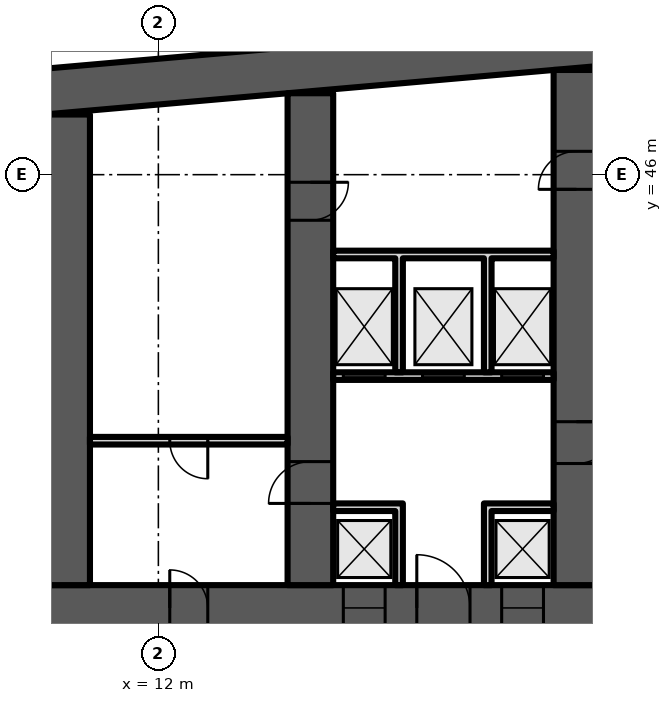
"""IFC4 building model, lengths in metres.
Left out: names, types, materials, properties, quantities, classifications, styles, units other than length and angle.
Written with IfcOpenShell. Run it as: python <this file> out.ifc"""

import sys

from ifc_helpers import new_model, si_unit, direction, frame, frame_2d, origin, place, context, subcontext, project, spatial, polyline, rectangle, outline, extrude, element, fill, save


model = new_model("IFC4")
c1 = context("Model", 3, precision=1e-05, world=origin(), true_north=direction((0.0, 1.0)))
c2 = subcontext(c1, "Body", "Model", "MODEL_VIEW")
j1 = project(units=[si_unit("LENGTHUNIT", "METRE"), si_unit("PLANEANGLEUNIT", "RADIAN")], contexts=[c1])
p1 = place(None, origin())
s1 = spatial("IfcSite", under=j1, at=p1, CompositionType="ELEMENT")
p2 = place(p1, origin())
s2 = spatial("IfcBuilding", under=s1, at=p2, CompositionType="ELEMENT")
p3 = place(p2, frame((0.0, 0.0, 55.9)))
s3 = spatial("IfcBuildingStorey", under=s2, at=p3, CompositionType="ELEMENT", Elevation=55.9)
p4 = place(p3, origin())
e1 = element("IfcWall", 1, at=p4, inside=s3, PredefinedType="SHEAR", context=c2, shape_type="SweptSolid", body=[
    extrude(outline(polyline([(9.0, 47.583), (37.0, 50.032), (65.0, 47.583), (65.0, 48.787), (37.0, 51.237), (9.0, 48.787), (9.0, 47.583)])), origin(), (0.0, 0.0, 1.0), 3.6),
])
p5 = place(p3, frame((9.0, 34.6, 0.0), z_axis=(0.0, 0.0, 1.0), x_axis=(1.0, 0.0, 0.0)))
e2 = element("IfcWall", 2, at=p5, inside=s3, PredefinedType="SHEAR", context=c2, shape_type="SweptSolid", body=[
    extrude(rectangle(XDim=56.0, YDim=1.2, at=frame_2d((28.0, 0.0))), origin(), (0.0, 0.0, 1.0), 3.6),
])
p6 = place(p5, frame((3.3, 0.0, 0.0)))
e3 = element("IfcOpeningElement", 3, at=p6, cuts=e2, PredefinedType="OPENING", context=c2, shape_type="SweptSolid", body=[
    extrude(rectangle(XDim=1.0, YDim=2.1, at=frame_2d((0.5, 1.05))), frame((0.0, 0.61, 0.0), z_axis=(0.0, -1.0, 0.0), x_axis=(1.0, 0.0, 0.0)), (0.0, 0.0, 1.0), 1.22),
])
p7 = place(p5, frame((7.867, 0.0, 0.0)))
e4 = element("IfcOpeningElement", 4, at=p7, cuts=e2, PredefinedType="OPENING", context=c2, shape_type="SweptSolid", body=[
    extrude(rectangle(XDim=1.1, YDim=2.1, at=frame_2d((0.55, 1.05))), frame((0.0, 0.61, 0.0), z_axis=(0.0, -1.0, 0.0), x_axis=(1.0, 0.0, 0.0)), (0.0, 0.0, 1.0), 1.22),
])
p8 = place(p5, frame((12.033, 0.0, 0.0)))
e5 = element("IfcOpeningElement", 5, at=p8, cuts=e2, PredefinedType="OPENING", context=c2, shape_type="SweptSolid", body=[
    extrude(rectangle(XDim=1.1, YDim=2.1, at=frame_2d((0.55, 1.05))), frame((0.0, 0.61, 0.0), z_axis=(0.0, -1.0, 0.0), x_axis=(1.0, 0.0, 0.0)), (0.0, 0.0, 1.0), 1.22),
])
p9 = place(p5, frame((9.8, 0.0, 0.0)))
e6 = element("IfcOpeningElement", 6, at=p9, cuts=e2, PredefinedType="OPENING", context=c2, shape_type="SweptSolid", body=[
    extrude(rectangle(XDim=1.4, YDim=2.1, at=frame_2d((0.7, 1.05))), frame((0.0, 0.61, 0.0), z_axis=(0.0, -1.0, 0.0), x_axis=(1.0, 0.0, 0.0)), (0.0, 0.0, 1.0), 1.22),
])
p10 = place(p5, frame((14.65, 0.0, 0.0)))
e7 = element("IfcOpeningElement", 7, at=p10, cuts=e2, PredefinedType="OPENING", context=c2, shape_type="SweptSolid", body=[
    extrude(rectangle(XDim=1.2, YDim=2.1, at=frame_2d((0.6, 1.05))), frame((0.0, 0.61, 0.0), z_axis=(0.0, -1.0, 0.0), x_axis=(1.0, 0.0, 0.0)), (0.0, 0.0, 1.0), 1.22),
])
p11 = place(p5, frame((21.867, 0.0, 0.0)))
e8 = element("IfcOpeningElement", 8, at=p11, cuts=e2, PredefinedType="OPENING", context=c2, shape_type="SweptSolid", body=[
    extrude(rectangle(XDim=1.1, YDim=2.1, at=frame_2d((0.55, 1.05))), frame((0.0, 0.61, 0.0), z_axis=(0.0, -1.0, 0.0), x_axis=(1.0, 0.0, 0.0)), (0.0, 0.0, 1.0), 1.22),
])
p12 = place(p5, frame((26.033, 0.0, 0.0)))
e9 = element("IfcOpeningElement", 9, at=p12, cuts=e2, PredefinedType="OPENING", context=c2, shape_type="SweptSolid", body=[
    extrude(rectangle(XDim=1.1, YDim=2.1, at=frame_2d((0.55, 1.05))), frame((0.0, 0.61, 0.0), z_axis=(0.0, -1.0, 0.0), x_axis=(1.0, 0.0, 0.0)), (0.0, 0.0, 1.0), 1.22),
])
p13 = place(p5, frame((23.8, 0.0, 0.0)))
e10 = element("IfcOpeningElement", 10, at=p13, cuts=e2, PredefinedType="OPENING", context=c2, shape_type="SweptSolid", body=[
    extrude(rectangle(XDim=1.4, YDim=2.1, at=frame_2d((0.7, 1.05))), frame((0.0, 0.61, 0.0), z_axis=(0.0, -1.0, 0.0), x_axis=(1.0, 0.0, 0.0)), (0.0, 0.0, 1.0), 1.22),
])
p14 = place(p5, frame((28.867, 0.0, 0.0)))
e11 = element("IfcOpeningElement", 11, at=p14, cuts=e2, PredefinedType="OPENING", context=c2, shape_type="SweptSolid", body=[
    extrude(rectangle(XDim=1.1, YDim=2.1, at=frame_2d((0.55, 1.05))), frame((0.0, 0.61, 0.0), z_axis=(0.0, -1.0, 0.0), x_axis=(1.0, 0.0, 0.0)), (0.0, 0.0, 1.0), 1.22),
])
p15 = place(p5, frame((33.033, 0.0, 0.0)))
e12 = element("IfcOpeningElement", 12, at=p15, cuts=e2, PredefinedType="OPENING", context=c2, shape_type="SweptSolid", body=[
    extrude(rectangle(XDim=1.1, YDim=2.1, at=frame_2d((0.55, 1.05))), frame((0.0, 0.61, 0.0), z_axis=(0.0, -1.0, 0.0), x_axis=(1.0, 0.0, 0.0)), (0.0, 0.0, 1.0), 1.22),
])
p16 = place(p5, frame((40.15, 0.0, 0.0)))
e13 = element("IfcOpeningElement", 13, at=p16, cuts=e2, PredefinedType="OPENING", context=c2, shape_type="SweptSolid", body=[
    extrude(rectangle(XDim=1.2, YDim=2.1, at=frame_2d((0.6, 1.05))), frame((0.0, 0.61, 0.0), z_axis=(0.0, -1.0, 0.0), x_axis=(1.0, 0.0, 0.0)), (0.0, 0.0, 1.0), 1.22),
])
p17 = place(p5, frame((44.8, 0.0, 0.0)))
e14 = element("IfcOpeningElement", 14, at=p17, cuts=e2, PredefinedType="OPENING", context=c2, shape_type="SweptSolid", body=[
    extrude(rectangle(XDim=1.4, YDim=2.1, at=frame_2d((0.7, 1.05))), frame((0.0, 0.61, 0.0), z_axis=(0.0, -1.0, 0.0), x_axis=(1.0, 0.0, 0.0)), (0.0, 0.0, 1.0), 1.22),
])
p18 = place(p5, frame((49.867, 0.0, 0.0)))
e15 = element("IfcOpeningElement", 15, at=p18, cuts=e2, PredefinedType="OPENING", context=c2, shape_type="SweptSolid", body=[
    extrude(rectangle(XDim=1.1, YDim=2.1, at=frame_2d((0.55, 1.05))), frame((0.0, 0.61, 0.0), z_axis=(0.0, -1.0, 0.0), x_axis=(1.0, 0.0, 0.0)), (0.0, 0.0, 1.0), 1.22),
])
p19 = place(p5, frame((53.5, 0.0, 0.0)))
e16 = element("IfcOpeningElement", 16, at=p19, cuts=e2, PredefinedType="OPENING", context=c2, shape_type="SweptSolid", body=[
    extrude(rectangle(XDim=1.1, YDim=2.1, at=frame_2d((0.55, 1.05))), frame((0.0, 0.61, 0.0), z_axis=(0.0, -1.0, 0.0), x_axis=(1.0, 0.0, 0.0)), (0.0, 0.0, 1.0), 1.22),
])
p20 = place(p5, frame((51.567, 0.0, 0.0)))
e17 = element("IfcOpeningElement", 17, at=p20, cuts=e2, PredefinedType="OPENING", context=c2, shape_type="SweptSolid", body=[
    extrude(rectangle(XDim=1.4, YDim=2.1, at=frame_2d((0.7, 1.05))), frame((0.0, 0.61, 0.0), z_axis=(0.0, -1.0, 0.0), x_axis=(1.0, 0.0, 0.0)), (0.0, 0.0, 1.0), 1.22),
])
p21 = place(p3, frame((9.6, 35.2, 0.0), z_axis=(0.0, 0.0, 1.0), x_axis=(0.0, 1.0, 0.0)))
e18 = element("IfcWall", 18, at=p21, inside=s3, PredefinedType="SHEAR", context=c2, shape_type="SweptSolid", body=[
    extrude(rectangle(XDim=12.383, YDim=1.2, at=frame_2d((6.191, 0.0))), origin(), (0.0, 0.0, 1.0), 3.6),
])
p22 = place(p3, frame((16.0, 35.2, 0.0), z_axis=(0.0, 0.0, 1.0), x_axis=(0.0, 1.0, 0.0)))
e19 = element("IfcWall", 19, at=p22, inside=s3, PredefinedType="SHEAR", context=c2, shape_type="SweptSolid", body=[
    extrude(rectangle(XDim=12.943, YDim=1.2, at=frame_2d((6.471, 0.0))), origin(), (0.0, 0.0, 1.0), 3.6),
])
p23 = place(p22, frame((2.15, 0.0, 0.0)))
e20 = element("IfcOpeningElement", 20, at=p23, cuts=e19, PredefinedType="OPENING", context=c2, shape_type="SweptSolid", body=[
    extrude(rectangle(XDim=1.1, YDim=2.1, at=frame_2d((0.55, 1.05))), frame((0.0, 0.61, 0.0), z_axis=(0.0, -1.0, 0.0), x_axis=(1.0, 0.0, 0.0)), (0.0, 0.0, 1.0), 1.22),
])
p24 = place(p22, frame((9.6, 0.0, 0.0)))
e21 = element("IfcOpeningElement", 21, at=p24, cuts=e19, PredefinedType="OPENING", context=c2, shape_type="SweptSolid", body=[
    extrude(rectangle(XDim=1.0, YDim=2.1, at=frame_2d((0.5, 1.05))), frame((0.0, 0.61, 0.0), z_axis=(0.0, -1.0, 0.0), x_axis=(1.0, 0.0, 0.0)), (0.0, 0.0, 1.0), 1.22),
])
p25 = place(p3, frame((23.0, 35.2, 0.0), z_axis=(0.0, 0.0, 1.0), x_axis=(0.0, 1.0, 0.0)))
e22 = element("IfcWall", 22, at=p25, inside=s3, PredefinedType="SHEAR", context=c2, shape_type="SweptSolid", body=[
    extrude(rectangle(XDim=13.555, YDim=1.2, at=frame_2d((6.778, 0.0))), origin(), (0.0, 0.0, 1.0), 3.6),
])
p26 = place(p25, frame((10.414, 0.0, 0.0)))
e23 = element("IfcOpeningElement", 23, at=p26, cuts=e22, PredefinedType="OPENING", context=c2, shape_type="SweptSolid", body=[
    extrude(rectangle(XDim=1.0, YDim=2.1, at=frame_2d((0.5, 1.05))), frame((0.0, 0.61, 0.0), z_axis=(0.0, -1.0, 0.0), x_axis=(1.0, 0.0, 0.0)), (0.0, 0.0, 1.0), 1.22),
])
p27 = place(p25, frame((3.2, 0.0, 0.0)))
e24 = element("IfcOpeningElement", 24, at=p27, cuts=e22, PredefinedType="OPENING", context=c2, shape_type="SweptSolid", body=[
    extrude(rectangle(XDim=1.1, YDim=2.1, at=frame_2d((0.55, 1.05))), frame((0.0, 0.61, 0.0), z_axis=(0.0, -1.0, 0.0), x_axis=(1.0, 0.0, 0.0)), (0.0, 0.0, 1.0), 1.22),
])
p28 = place(p3, frame((10.2, 39.0, 0.0), z_axis=(0.0, 0.0, 1.0), x_axis=(1.0, 0.0, 0.0)))
e25 = element("IfcWall", 25, at=p28, inside=s3, PredefinedType="PARTITIONING", context=c2, shape_type="SweptSolid", body=[
    extrude(rectangle(XDim=5.2, YDim=0.2, at=frame_2d((2.6, 0.0))), origin(), (0.0, 0.0, 1.0), 3.2),
])
p29 = place(p28, frame((2.1, 0.0, 0.0)))
e26 = element("IfcOpeningElement", 26, at=p29, cuts=e25, PredefinedType="OPENING", context=c2, shape_type="SweptSolid", body=[
    extrude(rectangle(XDim=1.0, YDim=2.1, at=frame_2d((0.5, 1.05))), frame((0.0, 0.11, 0.0), z_axis=(0.0, -1.0, 0.0), x_axis=(1.0, 0.0, 0.0)), (0.0, 0.0, 1.0), 0.22),
])
p30 = place(p3, frame((16.6, 40.7, 0.0), z_axis=(0.0, 0.0, 1.0), x_axis=(1.0, 0.0, 0.0)))
e27 = element("IfcWall", 27, at=p30, inside=s3, PredefinedType="PARTITIONING", context=c2, shape_type="SweptSolid", body=[
    extrude(rectangle(XDim=5.8, YDim=0.2, at=frame_2d((2.9, 0.0))), origin(), (0.0, 0.0, 1.0), 3.2),
])
p31 = place(p30, frame((0.267, 0.0, 0.0)))
e28 = element("IfcOpeningElement", 28, at=p31, cuts=e27, PredefinedType="OPENING", context=c2, shape_type="SweptSolid", body=[
    extrude(rectangle(XDim=1.1, YDim=2.1, at=frame_2d((0.55, 1.05))), frame((0.0, 0.11, 0.0), z_axis=(0.0, -1.0, 0.0), x_axis=(1.0, 0.0, 0.0)), (0.0, 0.0, 1.0), 0.22),
])
p32 = place(p30, frame((2.35, 0.0, 0.0)))
e29 = element("IfcOpeningElement", 29, at=p32, cuts=e27, PredefinedType="OPENING", context=c2, shape_type="SweptSolid", body=[
    extrude(rectangle(XDim=1.1, YDim=2.1, at=frame_2d((0.55, 1.05))), frame((0.0, 0.11, 0.0), z_axis=(0.0, -1.0, 0.0), x_axis=(1.0, 0.0, 0.0)), (0.0, 0.0, 1.0), 0.22),
])
p33 = place(p30, frame((4.433, 0.0, 0.0)))
e30 = element("IfcOpeningElement", 30, at=p33, cuts=e27, PredefinedType="OPENING", context=c2, shape_type="SweptSolid", body=[
    extrude(rectangle(XDim=1.1, YDim=2.1, at=frame_2d((0.55, 1.05))), frame((0.0, 0.11, 0.0), z_axis=(0.0, -1.0, 0.0), x_axis=(1.0, 0.0, 0.0)), (0.0, 0.0, 1.0), 0.22),
])
p34 = place(p3, origin())
e31 = element("IfcWall", 31, at=p34, inside=s3, PredefinedType="PARTITIONING", context=c2, shape_type="SweptSolid", body=[
    extrude(outline(polyline([(18.233, 37.15), (16.6, 37.15), (16.6, 37.35), (18.233, 37.35), (18.433, 37.35), (18.433, 35.2), (18.233, 35.2), (18.233, 37.15)])), origin(), (0.0, 0.0, 1.0), 3.2),
])
p35 = place(p3, origin())
e32 = element("IfcWall", 32, at=p35, inside=s3, PredefinedType="PARTITIONING", context=c2, shape_type="SweptSolid", body=[
    extrude(outline(polyline([(20.567, 37.35), (20.767, 37.35), (22.4, 37.35), (22.4, 37.15), (20.767, 37.15), (20.767, 35.2), (20.567, 35.2), (20.567, 37.35)])), origin(), (0.0, 0.0, 1.0), 3.2),
])
p36 = place(p3, origin())
e33 = element("IfcWall", 33, at=p36, inside=s3, PredefinedType="PARTITIONING", context=c2, shape_type="SweptSolid", body=[
    extrude(outline(polyline([(18.433, 40.8), (18.233, 40.8), (18.233, 43.8), (16.6, 43.8), (16.6, 44.0), (22.4, 44.0), (22.4, 43.8), (20.767, 43.8), (20.767, 40.8), (20.567, 40.8), (20.567, 43.8), (18.433, 43.8), (18.433, 40.8)])), origin(), (0.0, 0.0, 1.0), 3.2),
])
p37 = place(p6, origin())
e34 = element("IfcDoor", 34, at=p37, inside=s3, OperationType="SINGLE_SWING_LEFT", PredefinedType="DOOR", context=c2, shape_type="SweptSolid", body=[
    extrude(rectangle(XDim=1.0, YDim=2.1, at=frame_2d((0.5, 1.05))), frame((0.0, 0.6, 0.0), z_axis=(0.0, -1.0, 0.0), x_axis=(1.0, 0.0, 0.0)), (0.0, 0.0, 1.0), 1.199),
])
fill(e3, e34)
p38 = place(p29, origin())
e35 = element("IfcDoor", 35, at=p38, inside=s3, OperationType="SINGLE_SWING_RIGHT", PredefinedType="DOOR", context=c2, shape_type="SweptSolid", body=[
    extrude(rectangle(XDim=1.0, YDim=2.1, at=frame_2d((0.5, 1.05))), frame((0.0, 0.025, 0.0), z_axis=(0.0, -1.0, 0.0), x_axis=(1.0, 0.0, 0.0)), (0.0, 0.0, 1.0), 0.05),
])
fill(e26, e35)
p39 = place(p7, origin())
e36 = element("IfcDoor", 36, at=p39, inside=s3, OperationType="DOUBLE_DOOR_SLIDING", PredefinedType="DOOR", context=c2, shape_type="SweptSolid", body=[
    extrude(rectangle(XDim=1.1, YDim=2.1, at=frame_2d((0.55, 1.05))), frame((0.0, 0.025, 0.0), z_axis=(0.0, -1.0, 0.0), x_axis=(1.0, 0.0, 0.0)), (0.0, 0.0, 1.0), 0.05),
])
fill(e4, e36)
p40 = place(p8, origin())
e37 = element("IfcDoor", 37, at=p40, inside=s3, OperationType="DOUBLE_DOOR_SLIDING", PredefinedType="DOOR", context=c2, shape_type="SweptSolid", body=[
    extrude(rectangle(XDim=1.1, YDim=2.1, at=frame_2d((0.55, 1.05))), frame((0.0, 0.025, 0.0), z_axis=(0.0, -1.0, 0.0), x_axis=(1.0, 0.0, 0.0)), (0.0, 0.0, 1.0), 0.05),
])
fill(e5, e37)
p41 = place(p9, origin())
e38 = element("IfcDoor", 38, at=p41, inside=s3, OperationType="DOUBLE_DOOR_SINGLE_SWING", PredefinedType="DOOR", context=c2, shape_type="SweptSolid", body=[
    extrude(rectangle(XDim=1.4, YDim=2.1, at=frame_2d((0.7, 1.05))), frame((0.0, 0.025, 0.0), z_axis=(0.0, -1.0, 0.0), x_axis=(1.0, 0.0, 0.0)), (0.0, 0.0, 1.0), 0.05),
])
fill(e6, e38)
p42 = place(p31, origin())
e39 = element("IfcDoor", 39, at=p42, inside=s3, OperationType="DOUBLE_DOOR_SLIDING", PredefinedType="DOOR", context=c2, shape_type="SweptSolid", body=[
    extrude(rectangle(XDim=1.1, YDim=2.1, at=frame_2d((0.55, 1.05))), frame((0.0, 0.025, 0.0), z_axis=(0.0, -1.0, 0.0), x_axis=(1.0, 0.0, 0.0)), (0.0, 0.0, 1.0), 0.05),
])
fill(e28, e39)
p43 = place(p32, origin())
e40 = element("IfcDoor", 40, at=p43, inside=s3, OperationType="DOUBLE_DOOR_SLIDING", PredefinedType="DOOR", context=c2, shape_type="SweptSolid", body=[
    extrude(rectangle(XDim=1.1, YDim=2.1, at=frame_2d((0.55, 1.05))), frame((0.0, 0.025, 0.0), z_axis=(0.0, -1.0, 0.0), x_axis=(1.0, 0.0, 0.0)), (0.0, 0.0, 1.0), 0.05),
])
fill(e29, e40)
p44 = place(p33, origin())
e41 = element("IfcDoor", 41, at=p44, inside=s3, OperationType="DOUBLE_DOOR_SLIDING", PredefinedType="DOOR", context=c2, shape_type="SweptSolid", body=[
    extrude(rectangle(XDim=1.1, YDim=2.1, at=frame_2d((0.55, 1.05))), frame((0.0, 0.025, 0.0), z_axis=(0.0, -1.0, 0.0), x_axis=(1.0, 0.0, 0.0)), (0.0, 0.0, 1.0), 0.05),
])
fill(e30, e41)
p45 = place(p26, origin())
e42 = element("IfcDoor", 42, at=p45, inside=s3, OperationType="SINGLE_SWING_LEFT", PredefinedType="DOOR", context=c2, shape_type="SweptSolid", body=[
    extrude(rectangle(XDim=1.0, YDim=2.1, at=frame_2d((0.5, 1.05))), frame((0.0, 0.6, 0.0), z_axis=(0.0, -1.0, 0.0), x_axis=(1.0, 0.0, 0.0)), (0.0, 0.0, 1.0), 1.199),
])
fill(e23, e42)
p46 = place(p23, origin())
e43 = element("IfcDoor", 43, at=p46, inside=s3, OperationType="SINGLE_SWING_LEFT", PredefinedType="DOOR", context=c2, shape_type="SweptSolid", body=[
    extrude(rectangle(XDim=1.1, YDim=2.1, at=frame_2d((0.55, 1.05))), frame((0.0, 0.025, 0.0), z_axis=(0.0, -1.0, 0.0), x_axis=(1.0, 0.0, 0.0)), (0.0, 0.0, 1.0), 0.05),
])
fill(e20, e43)
p47 = place(p24, origin())
e44 = element("IfcDoor", 44, at=p47, inside=s3, OperationType="SINGLE_SWING_RIGHT", PredefinedType="DOOR", context=c2, shape_type="SweptSolid", body=[
    extrude(rectangle(XDim=1.0, YDim=2.1, at=frame_2d((0.5, 1.05))), frame((0.0, 0.6, 0.0), z_axis=(0.0, -1.0, 0.0), x_axis=(1.0, 0.0, 0.0)), (0.0, 0.0, 1.0), 1.199),
])
fill(e21, e44)
p48 = place(p27, origin())
e45 = element("IfcDoor", 45, at=p48, inside=s3, OperationType="SINGLE_SWING_RIGHT", PredefinedType="DOOR", context=c2, shape_type="SweptSolid", body=[
    extrude(rectangle(XDim=1.1, YDim=2.1, at=frame_2d((0.55, 1.05))), frame((0.0, 0.025, 0.0), z_axis=(0.0, -1.0, 0.0), x_axis=(1.0, 0.0, 0.0)), (0.0, 0.0, 1.0), 0.05),
])
fill(e24, e45)
save(model, sys.argv[1])
